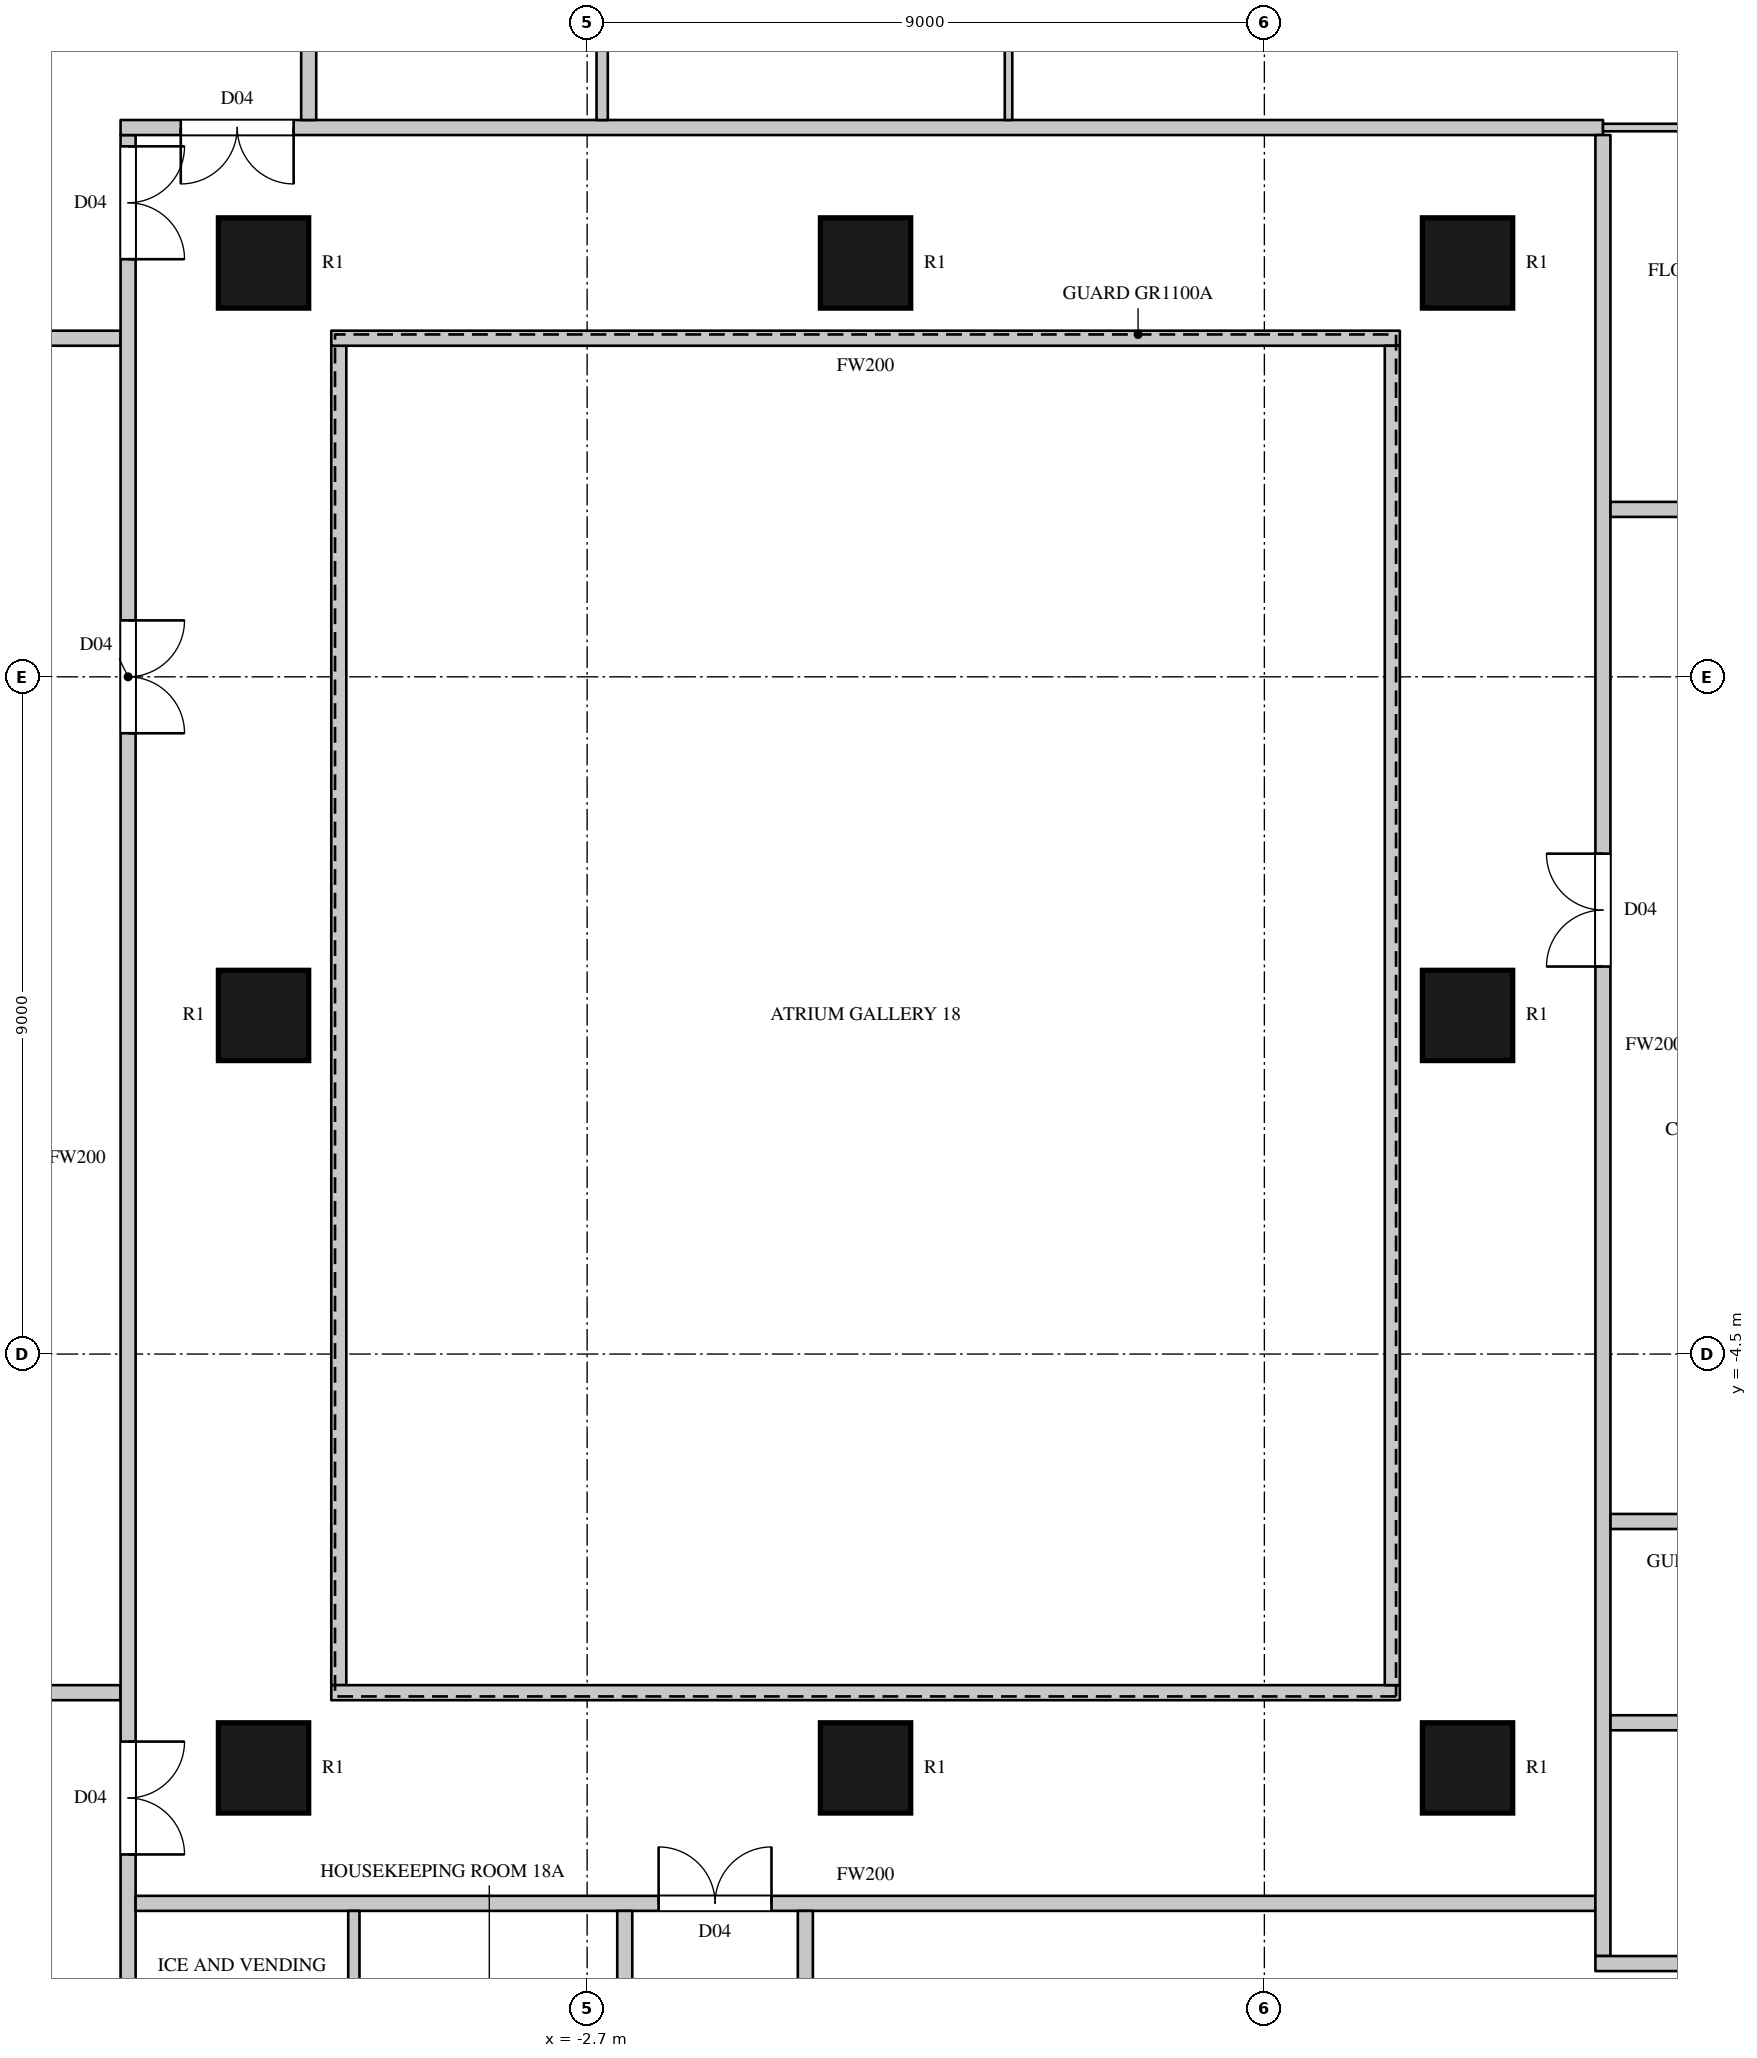
"""IFC4 building model, lengths in metres.
Left out: names, types, materials, properties, quantities, classifications, styles, units other than length and angle.
Written with IfcOpenShell. Run it as: python <this file> out.ifc"""

import sys

from ifc_helpers import new_model, si_unit, direction, frame, frame_2d, origin, origin_2d, place, context, subcontext, project, spatial, rectangle, circle, extrude, element, fill, save


model = new_model("IFC4")
c1 = context("Model", 3, precision=1e-05, world=origin(), true_north=direction((0.0, 1.0)))
c2 = subcontext(c1, "Body", "Model", "MODEL_VIEW")
j1 = project(units=[si_unit("LENGTHUNIT", "METRE"), si_unit("PLANEANGLEUNIT", "RADIAN")], contexts=[c1])
p1 = place(None, origin())
s1 = spatial("IfcSite", under=j1, at=p1, CompositionType="ELEMENT")
p2 = place(p1, origin())
s2 = spatial("IfcBuilding", under=s1, at=p2, CompositionType="ELEMENT")
p3 = place(p2, frame((0.0, 0.0, 95.1)))
s3 = spatial("IfcBuildingStorey", under=s2, at=p3, CompositionType="ELEMENT", Elevation=95.1)
for number, where, z_axis, x_axis in (
    (1, (-7.0, -10.0, 0.0), (0.0, 0.0, 1.0), (1.0, 0.0, 0.0)),
    (2, (-7.0, 0.0, 0.0), (0.0, 0.0, 1.0), (1.0, 0.0, 0.0)),
    (3, (-7.0, 10.0, 0.0), (0.0, 0.0, 1.0), (1.0, 0.0, 0.0)),
    (4, (1.0, -10.0, 0.0), (0.0, 0.0, 1.0), (1.0, 0.0, 0.0)),
    (5, (1.0, 10.0, 0.0), (0.0, 0.0, 1.0), (1.0, 0.0, 0.0)),
    (6, (9.0, -10.0, 0.0), (0.0, 0.0, 1.0), (1.0, 0.0, 0.0)),
    (7, (9.0, 0.0, 0.0), (0.0, 0.0, 1.0), (1.0, 0.0, 0.0)),
    (8, (9.0, 10.0, 0.0), (0.0, 0.0, 1.0), (1.0, 0.0, 0.0)),
):
    element("IfcColumn", number, at=place(p3, frame(where, z_axis=z_axis, x_axis=x_axis)), inside=s3, PredefinedType="COLUMN", context=c2, shape_type="SweptSolid", body=[
        extrude(circle(Radius=0.6, at=origin_2d()), origin(), (0.0, 0.0, 1.0), 3.6),
    ])
p4 = place(p3, frame((-13.97, -9.0, 0.0), z_axis=(0.0, 0.0, 1.0), x_axis=(1.0, 0.0, 0.0)))
e9 = element("IfcWall", 9, at=p4, inside=s3, PredefinedType="PARTITIONING", context=c2, shape_type="SweptSolid", body=[
    extrude(rectangle(XDim=5.07, YDim=0.2, at=frame_2d((2.535, 0.0))), origin(), (0.0, 0.0, 1.0), 3.3),
])
p5 = place(p4, frame((0.4, 0.0, 0.0)))
e10 = element("IfcOpeningElement", 10, at=p5, cuts=e9, PredefinedType="OPENING", context=c2, shape_type="SweptSolid", body=[
    extrude(rectangle(XDim=1.5, YDim=2.2, at=frame_2d((0.75, 1.1))), frame((0.0, 0.11, 0.0), z_axis=(0.0, -1.0, 0.0), x_axis=(1.0, 0.0, 0.0)), (0.0, 0.0, 1.0), 0.22),
])
p6 = place(p4, frame((2.05, 0.0, 0.0)))
e11 = element("IfcOpeningElement", 11, at=p6, cuts=e9, PredefinedType="OPENING", context=c2, shape_type="SweptSolid", body=[
    extrude(rectangle(XDim=1.5, YDim=2.2, at=frame_2d((0.75, 1.1))), frame((0.0, 0.11, 0.0), z_axis=(0.0, -1.0, 0.0), x_axis=(1.0, 0.0, 0.0)), (0.0, 0.0, 1.0), 0.22),
])
p7 = place(p3, frame((-13.97, 9.0, 0.0), z_axis=(0.0, 0.0, 1.0), x_axis=(1.0, 0.0, 0.0)))
e12 = element("IfcWall", 12, at=p7, inside=s3, PredefinedType="PARTITIONING", context=c2, shape_type="SweptSolid", body=[
    extrude(rectangle(XDim=5.07, YDim=0.2, at=frame_2d((2.535, 0.0))), origin(), (0.0, 0.0, 1.0), 3.3),
])
p8 = place(p3, frame((-8.8, -15.5, 0.0), z_axis=(0.0, 0.0, 1.0), x_axis=(0.0, 1.0, 0.0)))
e13 = element("IfcWall", 13, at=p8, inside=s3, PredefinedType="PARTITIONING", context=c2, shape_type="SweptSolid", body=[
    extrude(rectangle(XDim=27.2, YDim=0.2, at=frame_2d((13.6, 0.0))), origin(), (0.0, 0.0, 1.0), 3.3),
])
p9 = place(p8, frame((19.25, 0.0, 0.0)))
e14 = element("IfcOpeningElement", 14, at=p9, cuts=e13, PredefinedType="OPENING", context=c2, shape_type="SweptSolid", body=[
    extrude(rectangle(XDim=1.5, YDim=2.2, at=frame_2d((0.75, 1.1))), frame((0.0, 0.11, 0.0), z_axis=(0.0, -1.0, 0.0), x_axis=(1.0, 0.0, 0.0)), (0.0, 0.0, 1.0), 0.22),
])
p10 = place(p8, frame((4.35, 0.0, 0.0)))
e15 = element("IfcOpeningElement", 15, at=p10, cuts=e13, PredefinedType="OPENING", context=c2, shape_type="SweptSolid", body=[
    extrude(rectangle(XDim=1.5, YDim=2.2, at=frame_2d((0.75, 1.1))), frame((0.0, 0.11, 0.0), z_axis=(0.0, -1.0, 0.0), x_axis=(1.0, 0.0, 0.0)), (0.0, 0.0, 1.0), 0.22),
])
p11 = place(p8, frame((25.55, 0.0, 0.0)))
e16 = element("IfcOpeningElement", 16, at=p11, cuts=e13, PredefinedType="OPENING", context=c2, shape_type="SweptSolid", body=[
    extrude(rectangle(XDim=1.5, YDim=2.2, at=frame_2d((0.75, 1.1))), frame((0.0, 0.11, 0.0), z_axis=(0.0, -1.0, 0.0), x_axis=(1.0, 0.0, 0.0)), (0.0, 0.0, 1.0), 0.22),
])
p12 = place(p8, frame((0.15, 0.0, 0.0)))
e17 = element("IfcOpeningElement", 17, at=p12, cuts=e13, PredefinedType="OPENING", context=c2, shape_type="SweptSolid", body=[
    extrude(rectangle(XDim=0.9, YDim=2.2, at=frame_2d((0.45, 1.1))), frame((0.0, 0.11, 0.0), z_axis=(0.0, -1.0, 0.0), x_axis=(1.0, 0.0, 0.0)), (0.0, 0.0, 1.0), 0.22),
])
p13 = place(p3, frame((-8.7, -11.8, 0.0), z_axis=(0.0, 0.0, 1.0), x_axis=(1.0, 0.0, 0.0)))
e18 = element("IfcWall", 18, at=p13, inside=s3, PredefinedType="PARTITIONING", context=c2, shape_type="SweptSolid", body=[
    extrude(rectangle(XDim=19.4, YDim=0.2, at=frame_2d((9.7, 0.0))), origin(), (0.0, 0.0, 1.0), 3.3),
])
p14 = place(p13, frame((6.95, 0.0, 0.0)))
e19 = element("IfcOpeningElement", 19, at=p14, cuts=e18, PredefinedType="OPENING", context=c2, shape_type="SweptSolid", body=[
    extrude(rectangle(XDim=1.5, YDim=2.2, at=frame_2d((0.75, 1.1))), frame((0.0, 0.11, 0.0), z_axis=(0.0, -1.0, 0.0), x_axis=(1.0, 0.0, 0.0)), (0.0, 0.0, 1.0), 0.22),
])
p15 = place(p3, frame((-8.9, 11.8, 0.0), z_axis=(0.0, 0.0, 1.0), x_axis=(1.0, 0.0, 0.0)))
e20 = element("IfcWall", 20, at=p15, inside=s3, PredefinedType="PARTITIONING", context=c2, shape_type="SweptSolid", body=[
    extrude(rectangle(XDim=19.7, YDim=0.2, at=frame_2d((9.85, 0.0))), origin(), (0.0, 0.0, 1.0), 3.3),
])
p16 = place(p15, frame((0.8, 0.0, 0.0)))
e21 = element("IfcOpeningElement", 21, at=p16, cuts=e20, PredefinedType="OPENING", context=c2, shape_type="SweptSolid", body=[
    extrude(rectangle(XDim=1.5, YDim=2.2, at=frame_2d((0.75, 1.1))), frame((0.0, 0.11, 0.0), z_axis=(0.0, -1.0, 0.0), x_axis=(1.0, 0.0, 0.0)), (0.0, 0.0, 1.0), 0.22),
])
p17 = place(p3, frame((-6.4, 11.9, 0.0), z_axis=(0.0, 0.0, 1.0), x_axis=(0.0, 1.0, 0.0)))
e22 = element("IfcWall", 22, at=p17, inside=s3, PredefinedType="PARTITIONING", context=c2, shape_type="SweptSolid", body=[
    extrude(rectangle(XDim=3.6, YDim=0.2, at=frame_2d((1.8, 0.0))), origin(), (0.0, 0.0, 1.0), 3.3),
])
p18 = place(p17, frame((2.55, 0.0, 0.0)))
e23 = element("IfcOpeningElement", 23, at=p18, cuts=e22, PredefinedType="OPENING", context=c2, shape_type="SweptSolid", body=[
    extrude(rectangle(XDim=0.9, YDim=2.2, at=frame_2d((0.45, 1.1))), frame((0.0, 0.11, 0.0), z_axis=(0.0, -1.0, 0.0), x_axis=(1.0, 0.0, 0.0)), (0.0, 0.0, 1.0), 0.22),
])
p19 = place(p3, frame((-6.0, -8.9, 0.0), z_axis=(0.0, 0.0, 1.0), x_axis=(0.0, 1.0, 0.0)))
e24 = element("IfcWall", 24, at=p19, inside=s3, PredefinedType="PARTITIONING", context=c2, shape_type="SweptSolid", body=[
    extrude(rectangle(XDim=17.8, YDim=0.2, at=frame_2d((8.9, 0.0))), origin(), (0.0, 0.0, 1.0), 3.3),
])
for number, where, z_axis, x_axis in (
    (25, (-6.1, -9.0, 0.0), (0.0, 0.0, 1.0), (1.0, 0.0, 0.0)),
    (26, (-6.1, 9.0, 0.0), (0.0, 0.0, 1.0), (1.0, 0.0, 0.0)),
):
    element("IfcWall", number, at=place(p3, frame(where, z_axis=z_axis, x_axis=x_axis)), inside=s3, PredefinedType="PARTITIONING", context=c2, shape_type="SweptSolid", body=[
        extrude(rectangle(XDim=14.2, YDim=0.2, at=frame_2d((7.1, 0.0))), origin(), (0.0, 0.0, 1.0), 3.3),
    ])
p20 = place(p3, frame((-2.2, -15.5, 0.0), z_axis=(0.0, 0.0, 1.0), x_axis=(0.0, 1.0, 0.0)))
e27 = element("IfcWall", 27, at=p20, inside=s3, PredefinedType="PARTITIONING", context=c2, shape_type="SweptSolid", body=[
    extrude(rectangle(XDim=3.6, YDim=0.2, at=frame_2d((1.8, 0.0))), origin(), (0.0, 0.0, 1.0), 3.3),
])
p21 = place(p3, frame((0.2, -15.5, 0.0), z_axis=(0.0, 0.0, 1.0), x_axis=(0.0, 1.0, 0.0)))
e28 = element("IfcWall", 28, at=p21, inside=s3, PredefinedType="PARTITIONING", context=c2, shape_type="SweptSolid", body=[
    extrude(rectangle(XDim=3.6, YDim=0.2, at=frame_2d((1.8, 0.0))), origin(), (0.0, 0.0, 1.0), 3.3),
])
p22 = place(p21, frame((0.15, 0.0, 0.0)))
e29 = element("IfcOpeningElement", 29, at=p22, cuts=e28, PredefinedType="OPENING", context=c2, shape_type="SweptSolid", body=[
    extrude(rectangle(XDim=0.9, YDim=2.2, at=frame_2d((0.45, 1.1))), frame((0.0, 0.11, 0.0), z_axis=(0.0, -1.0, 0.0), x_axis=(1.0, 0.0, 0.0)), (0.0, 0.0, 1.0), 0.22),
])
p23 = place(p3, frame((8.0, -8.9, 0.0), z_axis=(0.0, 0.0, 1.0), x_axis=(0.0, 1.0, 0.0)))
e30 = element("IfcWall", 30, at=p23, inside=s3, PredefinedType="PARTITIONING", context=c2, shape_type="SweptSolid", body=[
    extrude(rectangle(XDim=17.8, YDim=0.2, at=frame_2d((8.9, 0.0))), origin(), (0.0, 0.0, 1.0), 3.3),
])
p24 = place(p3, frame((10.799, -12.5, 0.0), z_axis=(0.0, 0.0, 1.0), x_axis=(0.0, 1.0, 0.0)))
e31 = element("IfcWall", 31, at=p24, inside=s3, PredefinedType="PARTITIONING", context=c2, shape_type="SweptSolid", body=[
    extrude(rectangle(XDim=24.2, YDim=0.2, at=frame_2d((12.1, 0.0))), origin(), (0.0, 0.0, 1.0), 3.3),
])
p25 = place(p24, frame((13.15, 0.0, 0.0)))
e32 = element("IfcOpeningElement", 32, at=p25, cuts=e31, PredefinedType="OPENING", context=c2, shape_type="SweptSolid", body=[
    extrude(rectangle(XDim=1.5, YDim=2.2, at=frame_2d((0.75, 1.1))), frame((0.0, 0.11, 0.0), z_axis=(0.0, -1.0, 0.0), x_axis=(1.0, 0.0, 0.0)), (0.0, 0.0, 1.0), 0.22),
])
p26 = place(p3, frame((10.699, -12.6, 0.0), z_axis=(0.0, 0.0, 1.0), x_axis=(1.0, 0.0, 0.0)))
e33 = element("IfcWall", 33, at=p26, inside=s3, PredefinedType="PARTITIONING", context=c2, shape_type="SweptSolid", body=[
    extrude(rectangle(XDim=3.601, YDim=0.2, at=frame_2d((1.801, 0.0))), origin(), (0.0, 0.0, 1.0), 3.3),
])
p27 = place(p3, frame((10.9, -9.4, 0.0), z_axis=(0.0, 0.0, 1.0), x_axis=(1.0, 0.0, 0.0)))
e34 = element("IfcWall", 34, at=p27, inside=s3, PredefinedType="PARTITIONING", context=c2, shape_type="SweptSolid", body=[
    extrude(rectangle(XDim=3.4, YDim=0.2, at=frame_2d((1.7, 0.0))), origin(), (0.0, 0.0, 1.0), 3.3),
])
p28 = place(p27, frame((1.5, 0.0, 0.0)))
e35 = element("IfcOpeningElement", 35, at=p28, cuts=e34, PredefinedType="OPENING", context=c2, shape_type="SweptSolid", body=[
    extrude(rectangle(XDim=1.6, YDim=2.4, at=frame_2d((0.8, 1.2))), frame((0.0, 0.11, 0.0), z_axis=(0.0, -1.0, 0.0), x_axis=(1.0, 0.0, 0.0)), (0.0, 0.0, 1.0), 0.22),
])
p29 = place(p3, frame((10.9, -6.725, 0.0), z_axis=(0.0, 0.0, 1.0), x_axis=(1.0, 0.0, 0.0)))
e36 = element("IfcWall", 36, at=p29, inside=s3, PredefinedType="PARTITIONING", context=c2, shape_type="SweptSolid", body=[
    extrude(rectangle(XDim=3.4, YDim=0.2, at=frame_2d((1.7, 0.0))), origin(), (0.0, 0.0, 1.0), 3.3),
])
p30 = place(p3, frame((10.9, 6.725, 0.0), z_axis=(0.0, 0.0, 1.0), x_axis=(1.0, 0.0, 0.0)))
e37 = element("IfcWall", 37, at=p30, inside=s3, PredefinedType="PARTITIONING", context=c2, shape_type="SweptSolid", body=[
    extrude(rectangle(XDim=3.4, YDim=0.2, at=frame_2d((1.7, 0.0))), origin(), (0.0, 0.0, 1.0), 3.3),
])
p31 = place(p30, frame((2.1, 0.0, 0.0)))
e38 = element("IfcOpeningElement", 38, at=p31, cuts=e37, PredefinedType="OPENING", context=c2, shape_type="SweptSolid", body=[
    extrude(rectangle(XDim=0.95, YDim=2.2, at=frame_2d((0.475, 1.1))), frame((0.0, 0.11, 0.0), z_axis=(0.0, -1.0, 0.0), x_axis=(1.0, 0.0, 0.0)), (0.0, 0.0, 1.0), 0.22),
])
p32 = place(p3, frame((-5.8, -15.5, 0.0), z_axis=(0.0, 0.0, 1.0), x_axis=(0.0, 1.0, 0.0)))
e39 = element("IfcWall", 39, at=p32, inside=s3, PredefinedType="PARTITIONING", context=c2, shape_type="SweptSolid", body=[
    extrude(rectangle(XDim=3.6, YDim=0.15, at=frame_2d((1.8, 0.0))), origin(), (0.0, 0.0, 1.0), 3.3),
])
p33 = place(p3, frame((-2.5, 11.9, 0.0), z_axis=(0.0, 0.0, 1.0), x_axis=(0.0, 1.0, 0.0)))
e40 = element("IfcWall", 40, at=p33, inside=s3, PredefinedType="PARTITIONING", context=c2, shape_type="SweptSolid", body=[
    extrude(rectangle(XDim=3.6, YDim=0.15, at=frame_2d((1.8, 0.0))), origin(), (0.0, 0.0, 1.0), 2.75),
])
p34 = place(p3, frame((2.9, 11.9, 0.0), z_axis=(0.0, 0.0, 1.0), x_axis=(0.0, 1.0, 0.0)))
e41 = element("IfcWall", 41, at=p34, inside=s3, PredefinedType="PARTITIONING", context=c2, shape_type="SweptSolid", body=[
    extrude(rectangle(XDim=3.6, YDim=0.1, at=frame_2d((1.8, 0.0))), origin(), (0.0, 0.0, 1.0), 3.3),
])
p35 = place(p3, frame((10.8, 11.8, 0.0), z_axis=(0.0, 0.0, 1.0), x_axis=(1.0, 0.0, 0.0)))
e42 = element("IfcWall", 42, at=p35, inside=s3, PredefinedType="PARTITIONING", context=c2, shape_type="SweptSolid", body=[
    extrude(rectangle(XDim=3.3, YDim=0.1, at=frame_2d((1.65, 0.0))), origin(), (0.0, 0.0, 1.0), 3.3),
])
p36 = place(p9, origin())
e43 = element("IfcDoor", 43, at=p36, inside=s3, OperationType="DOUBLE_DOOR_SINGLE_SWING", PredefinedType="DOOR", context=c2, shape_type="SweptSolid", body=[
    extrude(rectangle(XDim=1.5, YDim=2.2, at=frame_2d((0.75, 1.1))), frame((0.0, 0.025, 0.0), z_axis=(0.0, -1.0, 0.0), x_axis=(1.0, 0.0, 0.0)), (0.0, 0.0, 1.0), 0.05),
])
fill(e14, e43)
p37 = place(p10, origin())
e44 = element("IfcDoor", 44, at=p37, inside=s3, OperationType="DOUBLE_DOOR_SINGLE_SWING", PredefinedType="DOOR", context=c2, shape_type="SweptSolid", body=[
    extrude(rectangle(XDim=1.5, YDim=2.2, at=frame_2d((0.75, 1.1))), frame((0.0, 0.025, 0.0), z_axis=(0.0, -1.0, 0.0), x_axis=(1.0, 0.0, 0.0)), (0.0, 0.0, 1.0), 0.05),
])
fill(e15, e44)
p38 = place(p11, origin())
e45 = element("IfcDoor", 45, at=p38, inside=s3, OperationType="DOUBLE_DOOR_SINGLE_SWING", PredefinedType="DOOR", context=c2, shape_type="SweptSolid", body=[
    extrude(rectangle(XDim=1.5, YDim=2.2, at=frame_2d((0.75, 1.1))), frame((0.0, 0.025, 0.0), z_axis=(0.0, -1.0, 0.0), x_axis=(1.0, 0.0, 0.0)), (0.0, 0.0, 1.0), 0.05),
])
fill(e16, e45)
p39 = place(p14, origin())
e46 = element("IfcDoor", 46, at=p39, inside=s3, OperationType="DOUBLE_DOOR_SINGLE_SWING", PredefinedType="DOOR", context=c2, shape_type="SweptSolid", body=[
    extrude(rectangle(XDim=1.5, YDim=2.2, at=frame_2d((0.75, 1.1))), frame((0.0, 0.025, 0.0), z_axis=(0.0, -1.0, 0.0), x_axis=(1.0, 0.0, 0.0)), (0.0, 0.0, 1.0), 0.05),
])
fill(e19, e46)
p40 = place(p16, origin())
e47 = element("IfcDoor", 47, at=p40, inside=s3, OperationType="DOUBLE_DOOR_SINGLE_SWING", PredefinedType="DOOR", context=c2, shape_type="SweptSolid", body=[
    extrude(rectangle(XDim=1.5, YDim=2.2, at=frame_2d((0.75, 1.1))), frame((0.0, 0.025, 0.0), z_axis=(0.0, -1.0, 0.0), x_axis=(1.0, 0.0, 0.0)), (0.0, 0.0, 1.0), 0.05),
])
fill(e21, e47)
p41 = place(p25, origin())
e48 = element("IfcDoor", 48, at=p41, inside=s3, OperationType="DOUBLE_DOOR_SINGLE_SWING", PredefinedType="DOOR", context=c2, shape_type="SweptSolid", body=[
    extrude(rectangle(XDim=1.5, YDim=2.2, at=frame_2d((0.75, 1.1))), frame((0.0, 0.025, 0.0), z_axis=(0.0, -1.0, 0.0), x_axis=(1.0, 0.0, 0.0)), (0.0, 0.0, 1.0), 0.05),
])
fill(e32, e48)
save(model, sys.argv[1])
